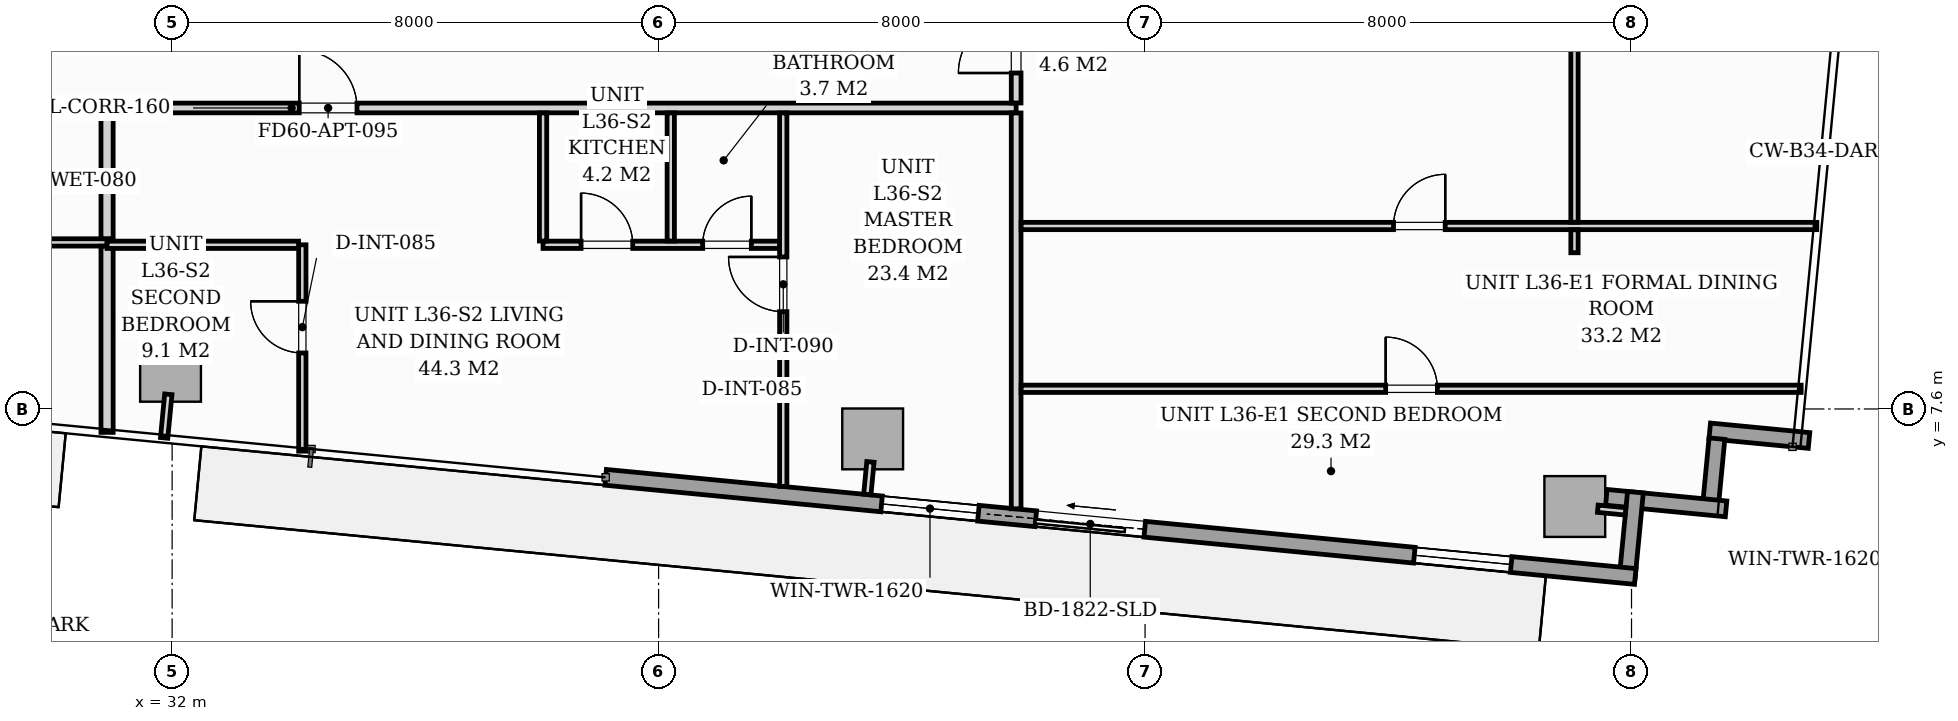
"""IFC4 building model, lengths in metres.
Left out: names, types, materials, properties, quantities, classifications, styles, units other than length and angle.
Written with IfcOpenShell. Run it as: python <this file> out.ifc"""

import sys

from ifc_helpers import new_model, si_unit, direction, frame, frame_2d, origin, origin_2d, place, context, subcontext, project, spatial, rectangle, extrude, source, transform, mapped, element, fill, save


model = new_model("IFC4")
c1 = context("Model", 3, precision=1e-05, world=origin(), true_north=direction((0.0, 1.0)))
c2 = subcontext(c1, "Body", "Model", "MODEL_VIEW")
j1 = project(units=[si_unit("LENGTHUNIT", "METRE"), si_unit("PLANEANGLEUNIT", "RADIAN")], contexts=[c1])
p1 = place(None, origin())
s1 = spatial("IfcSite", under=j1, at=p1, CompositionType="ELEMENT")
p2 = place(p1, origin())
s2 = spatial("IfcBuilding", under=s1, at=p2, CompositionType="ELEMENT")
p3 = place(p2, frame((0.0, 0.0, 127.8)))
s3 = spatial("IfcBuildingStorey", under=s2, at=p3, CompositionType="ELEMENT", Elevation=127.8)
m1 = source(origin(), c2, "Body", "SweptSolid", [
    extrude(rectangle(XDim=1.0, YDim=1.0, at=origin_2d()), origin(), (0.0, 0.0, 1.0), 3.196),
])
for number, where, z_axis, x_axis in (
    (1, (31.974, 8.22, 0.002), (0.0, 0.0, 1.0), (0.995, -0.096, 0.0)),
    (2, (43.521, 7.108, 0.002), (0.0, 0.0, 1.0), (0.995, -0.096, 0.0)),
    (3, (55.067, 5.996, 0.002), (0.0, 0.0, 1.0), (0.995, -0.096, 0.0)),
):
    element("IfcColumn", number, at=place(p3, frame(where, z_axis=z_axis, x_axis=x_axis)), inside=s3, PredefinedType="COLUMN", context=c2, shape_type="MappedRepresentation", body=[
        mapped(m1, transform((0.0, 0.0, 0.0), scale=1.0)),
    ])
p4 = place(p3, frame((58.919, 7.082, 0.0), z_axis=(0.0, 0.0, 1.0), x_axis=(-0.995393194909, 0.095876939504, 0.0)))
e4 = element("IfcWall", 4, at=p4, inside=s3, PredefinedType="STANDARD", context=c2, shape_type="SweptSolid", body=[
    extrude(rectangle(XDim=1.64, YDim=0.26, at=frame_2d((0.82, 0.0))), origin(), (0.0, 0.0, 1.0), 2.94),
])
p5 = place(p3, frame((57.405, 7.112, 0.0), z_axis=(0.0, 0.0, 1.0), x_axis=(-0.095971333708, -0.995384098279, 0.0)))
e5 = element("IfcWall", 5, at=p5, inside=s3, PredefinedType="STANDARD", context=c2, shape_type="SweptSolid", body=[
    extrude(rectangle(XDim=1.15, YDim=0.26, at=frame_2d((0.575, 0.0))), origin(), (0.0, 0.0, 1.0), 2.94),
])
p6 = place(p3, frame((57.555, 5.958, 0.0), z_axis=(0.0, 0.0, 1.0), x_axis=(-0.995401789159, 0.095787672171, 0.0)))
e6 = element("IfcWall", 6, at=p6, inside=s3, PredefinedType="STANDARD", context=c2, shape_type="SweptSolid", body=[
    extrude(rectangle(XDim=1.978, YDim=0.26, at=frame_2d((0.989, 0.0))), origin(), (0.0, 0.0, 1.0), 2.94),
])
p7 = place(p3, frame((56.064, 6.232, 0.0), z_axis=(0.0, 0.0, 1.0), x_axis=(-0.09589913835, -0.995391056452, 0.0)))
e7 = element("IfcWall", 7, at=p7, inside=s3, PredefinedType="STANDARD", context=c2, shape_type="SweptSolid", body=[
    extrude(rectangle(XDim=1.395, YDim=0.26, at=frame_2d((0.698, 0.0))), origin(), (0.0, 0.0, 1.0), 2.94),
])
p8 = place(p3, frame((56.061, 4.845, 0.0), z_axis=(0.0, 0.0, 1.0), x_axis=(-0.995395976631, 0.095848055311, 0.0)))
e8 = element("IfcWall", 8, at=p8, inside=s3, PredefinedType="STANDARD", context=c2, shape_type="SweptSolid", body=[
    extrude(rectangle(XDim=17.01, YDim=0.26, at=frame_2d((8.505, 0.0))), origin(), (0.0, 0.0, 1.0), 2.94),
])
p9 = place(p8, frame((8.104, 0.0, 0.0)))
e9 = element("IfcOpeningElement", 9, at=p9, cuts=e8, PredefinedType="OPENING", context=c2, shape_type="SweptSolid", body=[
    extrude(rectangle(XDim=1.8, YDim=2.06, at=frame_2d((0.9, 1.03))), frame((0.0, 0.14, 0.0), z_axis=(0.0, -1.0, 0.0), x_axis=(1.0, 0.0, 0.0)), (0.0, 0.0, 1.0), 0.28),
])
p10 = place(p8, frame((2.05, 0.0, 0.65)))
e10 = element("IfcOpeningElement", 10, at=p10, cuts=e8, PredefinedType="OPENING", context=c2, shape_type="SweptSolid", body=[
    extrude(rectangle(XDim=1.6, YDim=1.5, at=frame_2d((0.8, 0.75))), frame((0.0, 0.14, 0.0), z_axis=(0.0, -1.0, 0.0), x_axis=(1.0, 0.0, 0.0)), (0.0, 0.0, 1.0), 0.28),
])
p11 = place(p8, frame((10.852, 0.0, 0.75)))
e11 = element("IfcOpeningElement", 11, at=p11, cuts=e8, PredefinedType="OPENING", context=c2, shape_type="SweptSolid", body=[
    extrude(rectangle(XDim=1.6, YDim=1.5, at=frame_2d((0.8, 0.75))), frame((0.0, 0.14, 0.0), z_axis=(0.0, -1.0, 0.0), x_axis=(1.0, 0.0, 0.0)), (0.0, 0.0, 1.0), 0.28),
])
p12 = place(p3, frame((22.05, 12.55, 0.0), z_axis=(0.0, 0.0, 1.0), x_axis=(1.0, 0.0, 0.0)))
e12 = element("IfcWall", 12, at=p12, inside=s3, PredefinedType="PARTITIONING", context=c2, shape_type="SweptSolid", body=[
    extrude(rectangle(XDim=23.83, YDim=0.16, at=frame_2d((11.915, 0.0))), origin(), (0.0, 0.0, 1.0), 2.94),
])
p13 = place(p12, frame((0.655, 0.0, 0.0)))
e13 = element("IfcOpeningElement", 13, at=p13, cuts=e12, PredefinedType="OPENING", context=c2, shape_type="SweptSolid", body=[
    extrude(rectangle(XDim=0.95, YDim=2.06, at=frame_2d((0.475, 1.03))), frame((0.0, 0.09, 0.0), z_axis=(0.0, -1.0, 0.0), x_axis=(1.0, 0.0, 0.0)), (0.0, 0.0, 1.0), 0.18),
])
p14 = place(p12, frame((12.04, 0.0, 0.0)))
e14 = element("IfcOpeningElement", 14, at=p14, cuts=e12, PredefinedType="OPENING", context=c2, shape_type="SweptSolid", body=[
    extrude(rectangle(XDim=0.95, YDim=2.06, at=frame_2d((0.475, 1.03))), frame((0.0, 0.09, 0.0), z_axis=(0.0, -1.0, 0.0), x_axis=(1.0, 0.0, 0.0)), (0.0, 0.0, 1.0), 0.18),
])
p15 = place(p3, frame((45.88, 5.958, 0.0), z_axis=(0.0, 0.0, 1.0), x_axis=(0.0, 1.0, 0.0)))
e15 = element("IfcWall", 15, at=p15, inside=s3, PredefinedType="PARTITIONING", context=c2, shape_type="SweptSolid", body=[
    extrude(rectangle(XDim=6.51, YDim=0.16, at=frame_2d((3.255, 0.0))), origin(), (0.0, 0.0, 1.0), 2.94),
])
p16 = place(p3, frame((45.88, 12.632, 0.0), z_axis=(0.0, 0.0, 1.0), x_axis=(0.0, 1.0, 0.0)))
e16 = element("IfcWall", 16, at=p16, inside=s3, PredefinedType="PARTITIONING", context=c2, shape_type="SweptSolid", body=[
    extrude(rectangle(XDim=4.466, YDim=0.16, at=frame_2d((2.233, 0.0))), origin(), (0.0, 0.0, 1.0), 2.94),
])
p17 = place(p16, frame((0.493, 0.0, 0.0)))
e17 = element("IfcOpeningElement", 17, at=p17, cuts=e16, PredefinedType="OPENING", context=c2, shape_type="SweptSolid", body=[
    extrude(rectangle(XDim=0.95, YDim=2.06, at=frame_2d((0.475, 1.03))), frame((0.0, 0.09, 0.0), z_axis=(0.0, -1.0, 0.0), x_axis=(1.0, 0.0, 0.0)), (0.0, 0.0, 1.0), 0.18),
])
p18 = place(p3, frame((28.242, 10.339, 0.0), z_axis=(0.0, 0.0, 1.0), x_axis=(1.0, 0.0, 0.0)))
e18 = element("IfcWall", 18, at=p18, inside=s3, PredefinedType="PARTITIONING", context=c2, shape_type="SweptSolid", body=[
    extrude(rectangle(XDim=2.688, YDim=0.12, at=frame_2d((1.344, 0.0))), origin(), (0.0, 0.0, 1.0), 2.94),
])
p19 = place(p18, frame((0.863, 0.0, 0.0)))
e19 = element("IfcOpeningElement", 19, at=p19, cuts=e18, PredefinedType="OPENING", context=c2, shape_type="SweptSolid", body=[
    extrude(rectangle(XDim=0.8, YDim=2.02, at=frame_2d((0.4, 1.01))), frame((0.0, 0.07, 0.0), z_axis=(0.0, -1.0, 0.0), x_axis=(1.0, 0.0, 0.0)), (0.0, 0.0, 1.0), 0.14),
])
p20 = place(p3, frame((30.93, 7.215, 0.0), z_axis=(0.0, 0.0, 1.0), x_axis=(0.0, 1.0, 0.0)))
e20 = element("IfcWall", 20, at=p20, inside=s3, PredefinedType="PARTITIONING", context=c2, shape_type="SweptSolid", body=[
    extrude(rectangle(XDim=3.062, YDim=0.2, at=frame_2d((1.531, 0.0))), origin(), (0.0, 0.0, 1.0), 2.94),
])
p21 = place(p3, frame((30.93, 10.401, 0.0), z_axis=(0.0, 0.0, 1.0), x_axis=(0.0, 1.0, 0.0)))
e21 = element("IfcWall", 21, at=p21, inside=s3, PredefinedType="PARTITIONING", context=c2, shape_type="SweptSolid", body=[
    extrude(rectangle(XDim=2.067, YDim=0.2, at=frame_2d((1.034, 0.0))), origin(), (0.0, 0.0, 1.0), 2.94),
])
p22 = place(p3, frame((42.05, 6.327, 0.0), z_axis=(0.0, 0.0, 1.0), x_axis=(0.0, 1.0, 0.0)))
e22 = element("IfcWall", 22, at=p22, inside=s3, PredefinedType="PARTITIONING", context=c2, shape_type="SweptSolid", body=[
    extrude(rectangle(XDim=6.141, YDim=0.12, at=frame_2d((3.07, 0.0))), origin(), (0.0, 0.0, 1.0), 2.94),
])
p23 = place(p22, frame((2.873, 0.0, 0.0)))
e23 = element("IfcOpeningElement", 23, at=p23, cuts=e22, PredefinedType="OPENING", context=c2, shape_type="SweptSolid", body=[
    extrude(rectangle(XDim=0.9, YDim=2.05, at=frame_2d((0.45, 1.025))), frame((0.0, 0.07, 0.0), z_axis=(0.0, -1.0, 0.0), x_axis=(1.0, 0.0, 0.0)), (0.0, 0.0, 1.0), 0.14),
])
p24 = place(p3, frame((38.1, 10.3, 0.0), z_axis=(0.0, 0.0, 1.0), x_axis=(1.0, 0.0, 0.0)))
e24 = element("IfcWall", 24, at=p24, inside=s3, PredefinedType="PARTITIONING", context=c2, shape_type="SweptSolid", body=[
    extrude(rectangle(XDim=3.888, YDim=0.12, at=frame_2d((1.944, 0.0))), origin(), (0.0, 0.0, 1.0), 2.94),
])
p25 = place(p24, frame((0.625, 0.0, 0.0)))
e25 = element("IfcOpeningElement", 25, at=p25, cuts=e24, PredefinedType="OPENING", context=c2, shape_type="SweptSolid", body=[
    extrude(rectangle(XDim=0.85, YDim=2.05, at=frame_2d((0.425, 1.025))), frame((0.0, 0.07, 0.0), z_axis=(0.0, -1.0, 0.0), x_axis=(1.0, 0.0, 0.0)), (0.0, 0.0, 1.0), 0.14),
])
p26 = place(p24, frame((2.625, 0.0, 0.0)))
e26 = element("IfcOpeningElement", 26, at=p26, cuts=e24, PredefinedType="OPENING", context=c2, shape_type="SweptSolid", body=[
    extrude(rectangle(XDim=0.8, YDim=2.02, at=frame_2d((0.4, 1.01))), frame((0.0, 0.07, 0.0), z_axis=(0.0, -1.0, 0.0), x_axis=(1.0, 0.0, 0.0)), (0.0, 0.0, 1.0), 0.14),
])
for number, where, z_axis, x_axis in (
    (27, (40.2, 10.362, 0.0), (0.0, 0.0, 1.0), (0.0, 1.0, 0.0)),
    (28, (38.1, 10.362, 0.0), (0.0, 0.0, 1.0), (0.0, 1.0, 0.0)),
):
    element("IfcWall", number, at=place(p3, frame(where, z_axis=z_axis, x_axis=x_axis)), inside=s3, PredefinedType="PARTITIONING", context=c2, shape_type="SweptSolid", body=[
        extrude(rectangle(XDim=2.106, YDim=0.12, at=frame_2d((1.053, 0.0))), origin(), (0.0, 0.0, 1.0), 2.94),
    ])
p27 = place(p3, frame((34.141, 6.906, 0.0), z_axis=(0.0, 0.0, 1.0), x_axis=(0.0, 1.0, 0.0)))
e29 = element("IfcWall", 29, at=p27, inside=s3, PredefinedType="PARTITIONING", context=c2, shape_type="SweptSolid", body=[
    extrude(rectangle(XDim=3.394, YDim=0.12, at=frame_2d((1.697, 0.0))), origin(), (0.0, 0.0, 1.0), 2.94),
])
p28 = place(p27, frame((1.615, 0.0, 0.0)))
e30 = element("IfcOpeningElement", 30, at=p28, cuts=e29, PredefinedType="OPENING", context=c2, shape_type="SweptSolid", body=[
    extrude(rectangle(XDim=0.85, YDim=2.05, at=frame_2d((0.425, 1.025))), frame((0.0, 0.07, 0.0), z_axis=(0.0, -1.0, 0.0), x_axis=(1.0, 0.0, 0.0)), (0.0, 0.0, 1.0), 0.14),
])
p29 = place(p3, frame((30.93, 10.3, 0.0), z_axis=(0.0, 0.0, 1.0), x_axis=(1.0, 0.0, 0.0)))
e31 = element("IfcWall", 31, at=p29, inside=s3, PredefinedType="PARTITIONING", context=c2, shape_type="SweptSolid", body=[
    extrude(rectangle(XDim=3.149, YDim=0.12, at=frame_2d((1.575, 0.0))), origin(), (0.0, 0.0, 1.0), 2.94),
])
p30 = place(p3, frame((45.962, 7.932, 0.0), z_axis=(0.0, 0.0, 1.0), x_axis=(1.0, 0.0, 0.0)))
e32 = element("IfcWall", 32, at=p30, inside=s3, PredefinedType="PARTITIONING", context=c2, shape_type="SweptSolid", body=[
    extrude(rectangle(XDim=12.828, YDim=0.12, at=frame_2d((6.414, 0.0))), origin(), (0.0, 0.0, 1.0), 2.94),
])
p31 = place(p30, frame((5.995, 0.0, 0.0)))
e33 = element("IfcOpeningElement", 33, at=p31, cuts=e32, PredefinedType="OPENING", context=c2, shape_type="SweptSolid", body=[
    extrude(rectangle(XDim=0.85, YDim=2.05, at=frame_2d((0.425, 1.025))), frame((0.0, 0.07, 0.0), z_axis=(0.0, -1.0, 0.0), x_axis=(1.0, 0.0, 0.0)), (0.0, 0.0, 1.0), 0.14),
])
p32 = place(p3, frame((45.962, 10.609, 0.0), z_axis=(0.0, 0.0, 1.0), x_axis=(1.0, 0.0, 0.0)))
e34 = element("IfcWall", 34, at=p32, inside=s3, PredefinedType="PARTITIONING", context=c2, shape_type="SweptSolid", body=[
    extrude(rectangle(XDim=13.085, YDim=0.12, at=frame_2d((6.543, 0.0))), origin(), (0.0, 0.0, 1.0), 2.94),
])
p33 = place(p32, frame((6.124, 0.0, 0.0)))
e35 = element("IfcOpeningElement", 35, at=p33, cuts=e34, PredefinedType="OPENING", context=c2, shape_type="SweptSolid", body=[
    extrude(rectangle(XDim=0.85, YDim=2.05, at=frame_2d((0.425, 1.025))), frame((0.0, 0.07, 0.0), z_axis=(0.0, -1.0, 0.0), x_axis=(1.0, 0.0, 0.0)), (0.0, 0.0, 1.0), 0.14),
])
p34 = place(p3, frame((55.062, 10.169, 0.0), z_axis=(0.0, 0.0, 1.0), x_axis=(0.0, 1.0, 0.0)))
e36 = element("IfcWall", 36, at=p34, inside=s3, PredefinedType="PARTITIONING", context=c2, shape_type="SweptSolid", body=[
    extrude(rectangle(XDim=0.378, YDim=0.12, at=frame_2d((0.189, 0.0))), origin(), (0.0, 0.0, 1.0), 2.94),
])
p35 = place(p3, frame((55.062, 10.671, 0.0), z_axis=(0.0, 0.0, 1.0), x_axis=(0.0, 1.0, 0.0)))
e37 = element("IfcWall", 37, at=p35, inside=s3, PredefinedType="PARTITIONING", context=c2, shape_type="SweptSolid", body=[
    extrude(rectangle(XDim=9.348, YDim=0.12, at=frame_2d((4.674, 0.0))), origin(), (0.0, 0.0, 1.0), 2.94),
])
p36 = place(p35, frame((4.249, 0.0, 0.0)))
e38 = element("IfcOpeningElement", 38, at=p36, cuts=e37, PredefinedType="OPENING", context=c2, shape_type="SweptSolid", body=[
    extrude(rectangle(XDim=0.85, YDim=2.05, at=frame_2d((0.425, 1.025))), frame((0.0, 0.07, 0.0), z_axis=(0.0, -1.0, 0.0), x_axis=(1.0, 0.0, 0.0)), (0.0, 0.0, 1.0), 0.14),
])
p37 = place(p3, frame((31.938, 7.841, 0.0), z_axis=(0.0, 0.0, 1.0), x_axis=(-0.095977354523, -0.995383517755, 0.0)))
e39 = element("IfcWall", 39, at=p37, inside=s3, PredefinedType="PARTITIONING", context=c2, shape_type="SweptSolid", body=[
    extrude(rectangle(XDim=0.72, YDim=0.12, at=frame_2d((0.36, 0.0))), origin(), (0.0, 0.0, 1.0), 2.94),
])
p38 = place(p3, frame((43.484, 6.729, 0.0), z_axis=(0.0, 0.0, 1.0), x_axis=(-0.095772948675, -0.995403205893, 0.0)))
e40 = element("IfcWall", 40, at=p38, inside=s3, PredefinedType="PARTITIONING", context=c2, shape_type="SweptSolid", body=[
    extrude(rectangle(XDim=0.538, YDim=0.12, at=frame_2d((0.269, 0.0))), origin(), (0.0, 0.0, 1.0), 2.94),
])
p39 = place(p3, frame((55.445, 5.96, 0.0), z_axis=(0.0, 0.0, 1.0), x_axis=(0.995384576284, -0.09596637586, 0.0)))
e41 = element("IfcWall", 41, at=p39, inside=s3, PredefinedType="PARTITIONING", context=c2, shape_type="SweptSolid", body=[
    extrude(rectangle(XDim=0.458, YDim=0.12, at=frame_2d((0.229, 0.0))), origin(), (0.0, 0.0, 1.0), 2.94),
])
m2 = source(origin(), c2, "Body", "SweptSolid", [
    extrude(rectangle(XDim=1.8, YDim=2.06, at=frame_2d((0.9, 1.03))), frame((0.0, 0.025, 0.0), z_axis=(0.0, -1.0, 0.0), x_axis=(1.0, 0.0, 0.0)), (0.0, 0.0, 1.0), 0.05),
])
p40 = place(p9, origin())
e42 = element("IfcDoor", 42, at=p40, inside=s3, OperationType="SLIDING_TO_RIGHT", PredefinedType="DOOR", context=c2, shape_type="MappedRepresentation", body=[
    mapped(m2, transform((0.0, 0.0, 0.0), scale=1.0)),
])
fill(e9, e42)
m3 = source(origin(), c2, "Body", "SweptSolid", [
    extrude(rectangle(XDim=1.6, YDim=1.5, at=frame_2d((0.8, 0.75))), frame((0.0, 0.03, 0.0), z_axis=(0.0, -1.0, 0.0), x_axis=(1.0, 0.0, 0.0)), (0.0, 0.0, 1.0), 0.06),
])
p41 = place(p10, origin())
e43 = element("IfcWindow", 43, at=p41, inside=s3, PartitioningType="SINGLE_PANEL", PredefinedType="WINDOW", context=c2, shape_type="MappedRepresentation", body=[
    mapped(m3, transform((0.0, 0.0, 0.0), scale=1.0)),
])
fill(e10, e43)
p42 = place(p11, origin())
e44 = element("IfcWindow", 44, at=p42, inside=s3, PartitioningType="SINGLE_PANEL", PredefinedType="WINDOW", context=c2, shape_type="MappedRepresentation", body=[
    mapped(m3, transform((0.0, 0.0, 0.0), scale=1.0)),
])
fill(e11, e44)
m4 = source(origin(), c2, "Body", "SweptSolid", [
    extrude(rectangle(XDim=0.85, YDim=2.05, at=frame_2d((0.425, 1.025))), frame((0.0, 0.025, 0.0), z_axis=(0.0, -1.0, 0.0), x_axis=(1.0, 0.0, 0.0)), (0.0, 0.0, 1.0), 0.05),
])
p43 = place(p28, origin())
e45 = element("IfcDoor", 45, at=p43, inside=s3, OperationType="SINGLE_SWING_RIGHT", PredefinedType="DOOR", context=c2, shape_type="MappedRepresentation", body=[
    mapped(m4, transform((0.0, 0.0, 0.0), scale=1.0)),
])
fill(e30, e45)
m5 = source(origin(), c2, "Body", "SweptSolid", [
    extrude(rectangle(XDim=0.95, YDim=2.06, at=frame_2d((0.475, 1.03))), frame((0.0, 0.025, 0.0), z_axis=(0.0, -1.0, 0.0), x_axis=(1.0, 0.0, 0.0)), (0.0, 0.0, 1.0), 0.05),
])
p44 = place(p14, origin())
e46 = element("IfcDoor", 46, at=p44, inside=s3, OperationType="SINGLE_SWING_LEFT", PredefinedType="DOOR", context=c2, shape_type="MappedRepresentation", body=[
    mapped(m5, transform((0.0, 0.0, 0.0), scale=1.0)),
])
fill(e14, e46)
m6 = source(origin(), c2, "Body", "SweptSolid", [
    extrude(rectangle(XDim=0.9, YDim=2.05, at=frame_2d((0.45, 1.025))), frame((0.0, 0.025, 0.0), z_axis=(0.0, -1.0, 0.0), x_axis=(1.0, 0.0, 0.0)), (0.0, 0.0, 1.0), 0.05),
])
p45 = place(p23, origin())
e47 = element("IfcDoor", 47, at=p45, inside=s3, OperationType="SINGLE_SWING_RIGHT", PredefinedType="DOOR", context=c2, shape_type="MappedRepresentation", body=[
    mapped(m6, transform((0.0, 0.0, 0.0), scale=1.0)),
])
fill(e23, e47)
p46 = place(p25, origin())
e48 = element("IfcDoor", 48, at=p46, inside=s3, OperationType="SINGLE_SWING_LEFT", PredefinedType="DOOR", context=c2, shape_type="MappedRepresentation", body=[
    mapped(m4, transform((0.0, 0.0, 0.0), scale=1.0)),
])
fill(e25, e48)
m7 = source(origin(), c2, "Body", "SweptSolid", [
    extrude(rectangle(XDim=0.8, YDim=2.02, at=frame_2d((0.4, 1.01))), frame((0.0, 0.025, 0.0), z_axis=(0.0, -1.0, 0.0), x_axis=(1.0, 0.0, 0.0)), (0.0, 0.0, 1.0), 0.05),
])
p47 = place(p26, origin())
e49 = element("IfcDoor", 49, at=p47, inside=s3, OperationType="SINGLE_SWING_RIGHT", PredefinedType="DOOR", context=c2, shape_type="MappedRepresentation", body=[
    mapped(m7, transform((0.0, 0.0, 0.0), scale=1.0)),
])
fill(e26, e49)
p48 = place(p17, origin())
e50 = element("IfcDoor", 50, at=p48, inside=s3, OperationType="SINGLE_SWING_LEFT", PredefinedType="DOOR", context=c2, shape_type="MappedRepresentation", body=[
    mapped(m5, transform((0.0, 0.0, 0.0), scale=1.0)),
])
fill(e17, e50)
p49 = place(p31, origin())
e51 = element("IfcDoor", 51, at=p49, inside=s3, OperationType="SINGLE_SWING_LEFT", PredefinedType="DOOR", context=c2, shape_type="MappedRepresentation", body=[
    mapped(m4, transform((0.0, 0.0, 0.0), scale=1.0)),
])
fill(e33, e51)
p50 = place(p33, origin())
e52 = element("IfcDoor", 52, at=p50, inside=s3, OperationType="SINGLE_SWING_RIGHT", PredefinedType="DOOR", context=c2, shape_type="MappedRepresentation", body=[
    mapped(m4, transform((0.0, 0.0, 0.0), scale=1.0)),
])
fill(e35, e52)
save(model, sys.argv[1])
